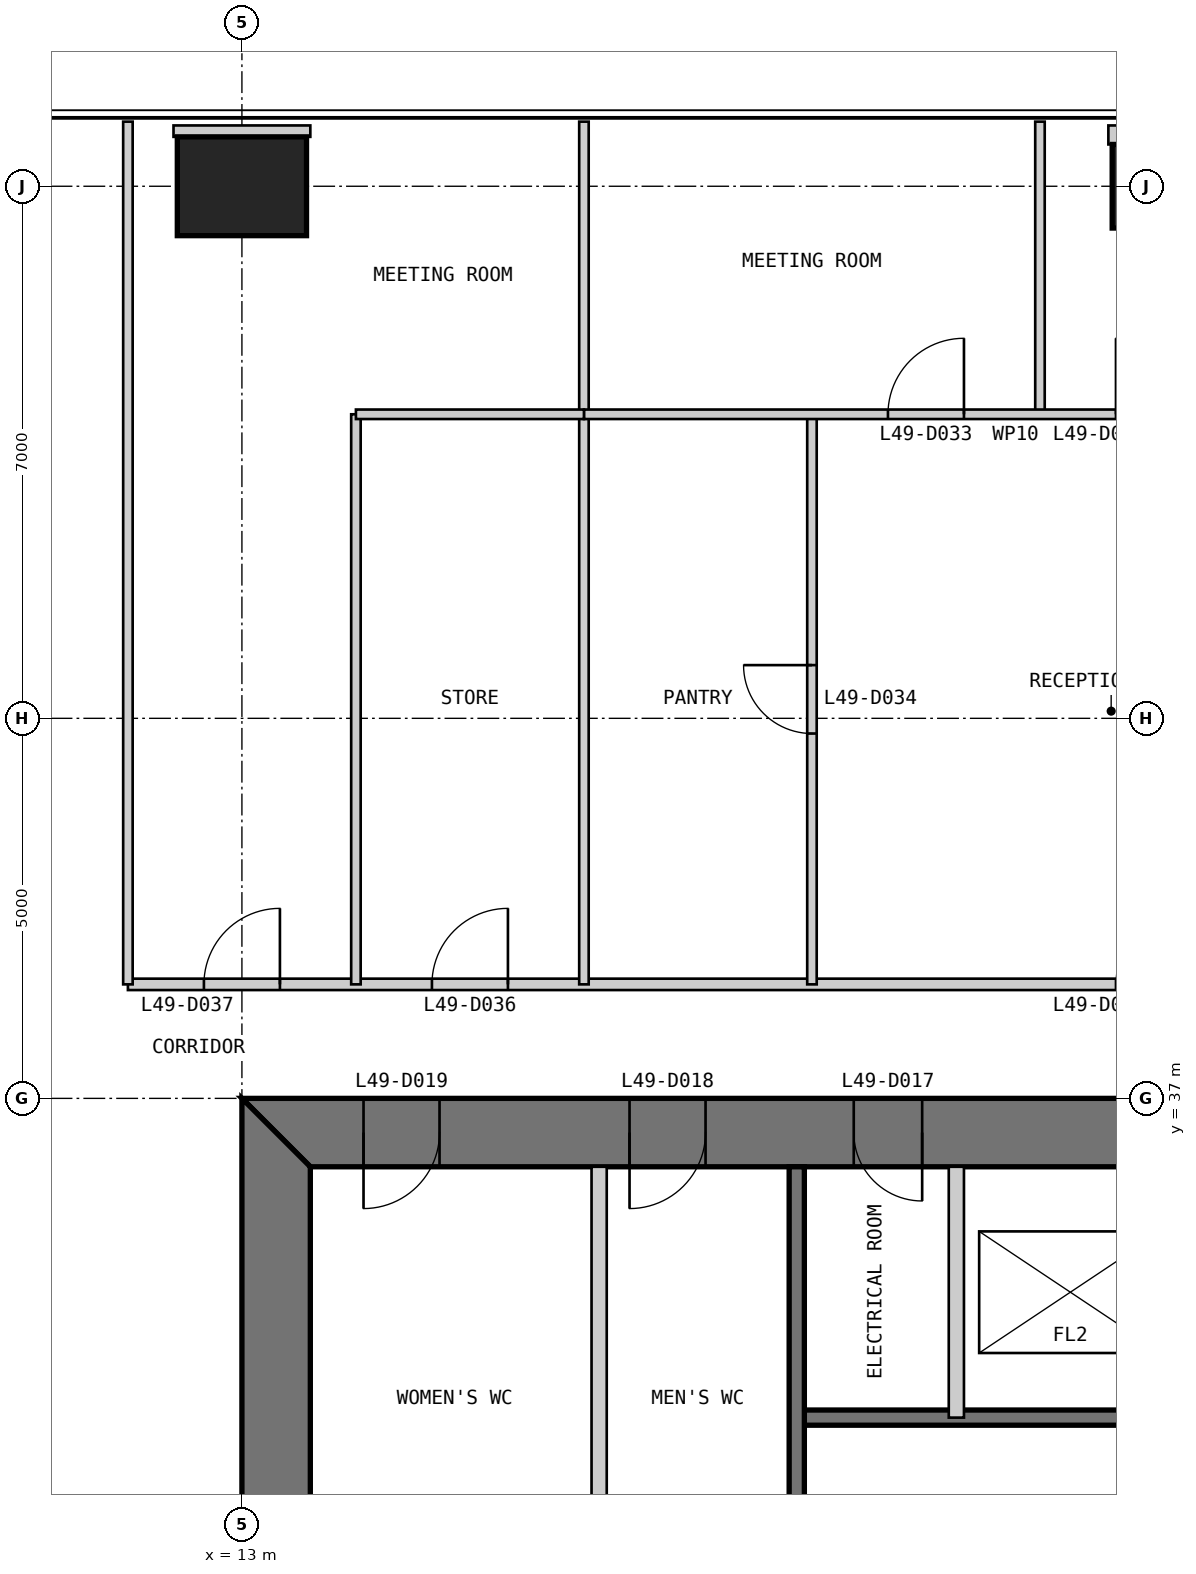
"""IFC4 building model, lengths in metres.
Left out: names, types, materials, properties, quantities, classifications, styles, units other than length and angle.
Written with IfcOpenShell. Run it as: python <this file> out.ifc"""

import sys

from ifc_helpers import new_model, si_unit, direction, frame, frame_2d, origin, origin_2d, place, context, subcontext, project, spatial, polyline, rectangle, outline, extrude, element, fill, save


model = new_model("IFC4")
c1 = context("Model", 3, precision=1e-05, world=origin(), true_north=direction((0.0, 1.0)))
c2 = subcontext(c1, "Body", "Model", "MODEL_VIEW")
j1 = project(units=[si_unit("LENGTHUNIT", "METRE"), si_unit("PLANEANGLEUNIT", "RADIAN")], contexts=[c1])
p1 = place(None, origin())
s1 = spatial("IfcSite", under=j1, at=p1, CompositionType="ELEMENT")
p2 = place(p1, origin())
s2 = spatial("IfcBuilding", under=s1, at=p2, CompositionType="ELEMENT")
p3 = place(p2, frame((0.0, 0.0, 209.8)))
s3 = spatial("IfcBuildingStorey", under=s2, at=p3, CompositionType="ELEMENT", Elevation=209.8)
p4 = place(p3, frame((25.0, 49.0, 0.0), z_axis=(0.0, 0.0, 1.0), x_axis=(1.0, 0.0, 0.0)))
e1 = element("IfcColumn", 1, at=p4, inside=s3, PredefinedType="COLUMN", context=c2, shape_type="SweptSolid", body=[
    extrude(rectangle(XDim=1.1, YDim=1.1, at=origin_2d()), origin(), (0.0, 0.0, 1.0), 4.0),
])
p5 = place(p3, frame((13.0, 49.0, 0.0), z_axis=(0.0, 0.0, 1.0), x_axis=(1.0, 0.0, 0.0)))
e2 = element("IfcColumn", 2, at=p5, inside=s3, PredefinedType="COLUMN", context=c2, shape_type="SweptSolid", body=[
    extrude(rectangle(XDim=1.7, YDim=1.3, at=origin_2d()), origin(), (0.0, 0.0, 1.0), 4.0),
])
p6 = place(p3, frame((37.0, 36.55, 0.0), z_axis=(0.0, 0.0, 1.0), x_axis=(-1.0, 0.0, 0.0)))
e3 = element("IfcWall", 3, at=p6, inside=s3, PredefinedType="SHEAR", context=c2, shape_type="SweptSolid", body=[
    extrude(outline(polyline([(0.0, -0.45), (24.0, -0.45), (23.1, 0.45), (0.9, 0.45), (0.0, -0.45)])), origin(), (0.0, 0.0, 1.0), 4.0),
])
p7 = place(p6, frame((4.9, 0.0, 0.0)))
e4 = element("IfcOpeningElement", 4, at=p7, cuts=e3, PredefinedType="OPENING", context=c2, shape_type="SweptSolid", body=[
    extrude(rectangle(XDim=1.0, YDim=2.2, at=frame_2d((0.5, 1.1))), frame((0.0, 0.46, 0.0), z_axis=(0.0, -1.0, 0.0), x_axis=(1.0, 0.0, 0.0)), (0.0, 0.0, 1.0), 0.92),
])
p8 = place(p6, frame((8.9, 0.0, 0.0)))
e5 = element("IfcOpeningElement", 5, at=p8, cuts=e3, PredefinedType="OPENING", context=c2, shape_type="SweptSolid", body=[
    extrude(rectangle(XDim=1.1, YDim=2.2, at=frame_2d((0.55, 1.1))), frame((0.0, 0.46, 0.0), z_axis=(0.0, -1.0, 0.0), x_axis=(1.0, 0.0, 0.0)), (0.0, 0.0, 1.0), 0.92),
])
p9 = place(p6, frame((15.05, 0.0, 0.0)))
e6 = element("IfcOpeningElement", 6, at=p9, cuts=e3, PredefinedType="OPENING", context=c2, shape_type="SweptSolid", body=[
    extrude(rectangle(XDim=0.9, YDim=2.2, at=frame_2d((0.45, 1.1))), frame((0.0, 0.46, 0.0), z_axis=(0.0, -1.0, 0.0), x_axis=(1.0, 0.0, 0.0)), (0.0, 0.0, 1.0), 0.92),
])
p10 = place(p6, frame((17.9, 0.0, 0.0)))
e7 = element("IfcOpeningElement", 7, at=p10, cuts=e3, PredefinedType="OPENING", context=c2, shape_type="SweptSolid", body=[
    extrude(rectangle(XDim=1.0, YDim=2.2, at=frame_2d((0.5, 1.1))), frame((0.0, 0.46, 0.0), z_axis=(0.0, -1.0, 0.0), x_axis=(1.0, 0.0, 0.0)), (0.0, 0.0, 1.0), 0.92),
])
p11 = place(p6, frame((21.4, 0.0, 0.0)))
e8 = element("IfcOpeningElement", 8, at=p11, cuts=e3, PredefinedType="OPENING", context=c2, shape_type="SweptSolid", body=[
    extrude(rectangle(XDim=1.0, YDim=2.2, at=frame_2d((0.5, 1.1))), frame((0.0, 0.46, 0.0), z_axis=(0.0, -1.0, 0.0), x_axis=(1.0, 0.0, 0.0)), (0.0, 0.0, 1.0), 0.92),
])
p12 = place(p3, frame((13.45, 36.1, 0.0), z_axis=(0.0, 0.0, 1.0), x_axis=(0.0, -1.0, 0.0)))
e9 = element("IfcWall", 9, at=p12, inside=s3, PredefinedType="SHEAR", context=c2, shape_type="SweptSolid", body=[
    extrude(outline(polyline([(-0.9, -0.45), (23.1, -0.45), (22.2, 0.45), (0.0, 0.45), (-0.9, -0.45)])), origin(), (0.0, 0.0, 1.0), 4.0),
])
p13 = place(p12, frame((20.2, 0.0, 0.0)))
e10 = element("IfcOpeningElement", 10, at=p13, cuts=e9, PredefinedType="OPENING", context=c2, shape_type="SweptSolid", body=[
    extrude(rectangle(XDim=1.0, YDim=2.2, at=frame_2d((0.5, 1.1))), frame((0.0, 0.46, 0.0), z_axis=(0.0, -1.0, 0.0), x_axis=(1.0, 0.0, 0.0)), (0.0, 0.0, 1.0), 0.92),
])
p14 = place(p12, frame((17.25, 0.0, 0.0)))
e11 = element("IfcOpeningElement", 11, at=p14, cuts=e9, PredefinedType="OPENING", context=c2, shape_type="SweptSolid", body=[
    extrude(rectangle(XDim=0.9, YDim=2.2, at=frame_2d((0.45, 1.1))), frame((0.0, 0.46, 0.0), z_axis=(0.0, -1.0, 0.0), x_axis=(1.0, 0.0, 0.0)), (0.0, 0.0, 1.0), 0.92),
])
p15 = place(p3, frame((29.7, 32.8, 0.0), z_axis=(0.0, 0.0, 1.0), x_axis=(-1.0, 0.0, 0.0)))
e12 = element("IfcWall", 12, at=p15, inside=s3, PredefinedType="SOLIDWALL", context=c2, shape_type="SweptSolid", body=[
    extrude(rectangle(XDim=9.4, YDim=0.2, at=frame_2d((4.7, 0.0))), origin(), (0.0, 0.0, 1.0), 3.8),
])
p16 = place(p15, frame((0.25, 0.0, 0.0)))
e13 = element("IfcOpeningElement", 13, at=p16, cuts=e12, PredefinedType="OPENING", context=c2, shape_type="SweptSolid", body=[
    extrude(rectangle(XDim=1.0, YDim=2.2, at=frame_2d((0.5, 1.1))), frame((0.0, 0.11, 0.0), z_axis=(0.0, -1.0, 0.0), x_axis=(1.0, 0.0, 0.0)), (0.0, 0.0, 1.0), 0.22),
])
p17 = place(p3, frame((22.4, 36.1, 0.0), z_axis=(0.0, 0.0, 1.0), x_axis=(0.0, -1.0, 0.0)))
e14 = element("IfcWall", 14, at=p17, inside=s3, PredefinedType="PARTITIONING", context=c2, shape_type="SweptSolid", body=[
    extrude(rectangle(XDim=3.3, YDim=0.2, at=frame_2d((1.65, 0.0))), origin(), (0.0, 0.0, 1.0), 3.8),
])
p18 = place(p3, frame((20.3, 36.1, 0.0), z_axis=(0.0, 0.0, 1.0), x_axis=(0.0, -1.0, 0.0)))
e15 = element("IfcWall", 15, at=p18, inside=s3, PredefinedType="SOLIDWALL", context=c2, shape_type="SweptSolid", body=[
    extrude(rectangle(XDim=6.1, YDim=0.2, at=frame_2d((3.05, 0.0))), origin(), (0.0, 0.0, 1.0), 3.8),
])
p19 = place(p3, frame((17.7, 36.1, 0.0), z_axis=(0.0, 0.0, 1.0), x_axis=(0.0, -1.0, 0.0)))
e16 = element("IfcWall", 16, at=p19, inside=s3, PredefinedType="PARTITIONING", context=c2, shape_type="SweptSolid", body=[
    extrude(rectangle(XDim=6.1, YDim=0.2, at=frame_2d((3.05, 0.0))), origin(), (0.0, 0.0, 1.0), 3.8),
])
p20 = place(p3, frame((38.5, 38.5, 0.0), z_axis=(0.0, 0.0, 1.0), x_axis=(-1.0, 0.0, 0.0)))
e17 = element("IfcWall", 17, at=p20, inside=s3, PredefinedType="PARTITIONING", context=c2, shape_type="SweptSolid", body=[
    extrude(rectangle(XDim=27.0, YDim=0.15, at=frame_2d((13.5, 0.0))), origin(), (0.0, 0.0, 1.0), 3.85),
])
p21 = place(p20, frame((13.0, 0.0, 0.0)))
e18 = element("IfcOpeningElement", 18, at=p21, cuts=e17, PredefinedType="OPENING", context=c2, shape_type="SweptSolid", body=[
    extrude(rectangle(XDim=1.0, YDim=2.2, at=frame_2d((0.5, 1.1))), frame((0.0, 0.085, 0.0), z_axis=(0.0, -1.0, 0.0), x_axis=(1.0, 0.0, 0.0)), (0.0, 0.0, 1.0), 0.17),
])
p22 = place(p20, frame((4.0, 0.0, 0.0)))
e19 = element("IfcOpeningElement", 19, at=p22, cuts=e17, PredefinedType="OPENING", context=c2, shape_type="SweptSolid", body=[
    extrude(rectangle(XDim=1.0, YDim=2.2, at=frame_2d((0.5, 1.1))), frame((0.0, 0.085, 0.0), z_axis=(0.0, -1.0, 0.0), x_axis=(1.0, 0.0, 0.0)), (0.0, 0.0, 1.0), 0.17),
])
p23 = place(p20, frame((22.0, 0.0, 0.0)))
e20 = element("IfcOpeningElement", 20, at=p23, cuts=e17, PredefinedType="OPENING", context=c2, shape_type="SweptSolid", body=[
    extrude(rectangle(XDim=1.0, YDim=2.2, at=frame_2d((0.5, 1.1))), frame((0.0, 0.085, 0.0), z_axis=(0.0, -1.0, 0.0), x_axis=(1.0, 0.0, 0.0)), (0.0, 0.0, 1.0), 0.17),
])
p24 = place(p20, frame((25.0, 0.0, 0.0)))
e21 = element("IfcOpeningElement", 21, at=p24, cuts=e17, PredefinedType="OPENING", context=c2, shape_type="SweptSolid", body=[
    extrude(rectangle(XDim=1.0, YDim=2.2, at=frame_2d((0.5, 1.1))), frame((0.0, 0.085, 0.0), z_axis=(0.0, -1.0, 0.0), x_axis=(1.0, 0.0, 0.0)), (0.0, 0.0, 1.0), 0.17),
])
p25 = place(p3, frame((23.5, 49.85, 0.0), z_axis=(0.0, 0.0, 1.0), x_axis=(0.0, -1.0, 0.0)))
e22 = element("IfcWall", 22, at=p25, inside=s3, PredefinedType="PARTITIONING", context=c2, shape_type="SweptSolid", body=[
    extrude(rectangle(XDim=3.85, YDim=0.125, at=frame_2d((1.925, 0.0))), origin(), (0.0, 0.0, 1.0), 3.85),
])
p26 = place(p3, frame((20.5, 46.0, 0.0), z_axis=(0.0, 0.0, 1.0), x_axis=(0.0, -1.0, 0.0)))
e23 = element("IfcWall", 23, at=p26, inside=s3, PredefinedType="PARTITIONING", context=c2, shape_type="SweptSolid", body=[
    extrude(rectangle(XDim=7.5, YDim=0.125, at=frame_2d((3.75, 0.0))), origin(), (0.0, 0.0, 1.0), 3.85),
])
p27 = place(p26, frame((3.3, 0.0, 0.0)))
e24 = element("IfcOpeningElement", 24, at=p27, cuts=e23, PredefinedType="OPENING", context=c2, shape_type="SweptSolid", body=[
    extrude(rectangle(XDim=0.9, YDim=2.2, at=frame_2d((0.45, 1.1))), frame((0.0, 0.073, 0.0), z_axis=(0.0, -1.0, 0.0), x_axis=(1.0, 0.0, 0.0)), (0.0, 0.0, 1.0), 0.145),
])
p28 = place(p3, frame((17.5, 49.85, 0.0), z_axis=(0.0, 0.0, 1.0), x_axis=(0.0, -1.0, 0.0)))
e25 = element("IfcWall", 25, at=p28, inside=s3, PredefinedType="PARTITIONING", context=c2, shape_type="SweptSolid", body=[
    extrude(rectangle(XDim=11.35, YDim=0.125, at=frame_2d((5.675, 0.0))), origin(), (0.0, 0.0, 1.0), 3.85),
])
p29 = place(p3, frame((14.5, 46.0, 0.0), z_axis=(0.0, 0.0, 1.0), x_axis=(0.0, -1.0, 0.0)))
e26 = element("IfcWall", 26, at=p29, inside=s3, PredefinedType="PARTITIONING", context=c2, shape_type="SweptSolid", body=[
    extrude(rectangle(XDim=7.5, YDim=0.125, at=frame_2d((3.75, 0.0))), origin(), (0.0, 0.0, 1.0), 3.85),
])
p30 = place(p3, frame((29.5, 46.0, 0.0), z_axis=(0.0, 0.0, 1.0), x_axis=(-1.0, 0.0, 0.0)))
e27 = element("IfcWall", 27, at=p30, inside=s3, PredefinedType="PARTITIONING", context=c2, shape_type="SweptSolid", body=[
    extrude(rectangle(XDim=12.0, YDim=0.125, at=frame_2d((6.0, 0.0))), origin(), (0.0, 0.0, 1.0), 3.85),
])
p31 = place(p30, frame((4.0, 0.0, 0.0)))
e28 = element("IfcOpeningElement", 28, at=p31, cuts=e27, PredefinedType="OPENING", context=c2, shape_type="SweptSolid", body=[
    extrude(rectangle(XDim=1.0, YDim=2.2, at=frame_2d((0.5, 1.1))), frame((0.0, 0.073, 0.0), z_axis=(0.0, -1.0, 0.0), x_axis=(1.0, 0.0, 0.0)), (0.0, 0.0, 1.0), 0.145),
])
p32 = place(p30, frame((7.0, 0.0, 0.0)))
e29 = element("IfcOpeningElement", 29, at=p32, cuts=e27, PredefinedType="OPENING", context=c2, shape_type="SweptSolid", body=[
    extrude(rectangle(XDim=1.0, YDim=2.2, at=frame_2d((0.5, 1.1))), frame((0.0, 0.073, 0.0), z_axis=(0.0, -1.0, 0.0), x_axis=(1.0, 0.0, 0.0)), (0.0, 0.0, 1.0), 0.145),
])
p33 = place(p3, frame((17.5, 46.0, 0.0), z_axis=(0.0, 0.0, 1.0), x_axis=(-1.0, 0.0, 0.0)))
e30 = element("IfcWall", 30, at=p33, inside=s3, PredefinedType="PARTITIONING", context=c2, shape_type="SweptSolid", body=[
    extrude(rectangle(XDim=3.0, YDim=0.125, at=frame_2d((1.5, 0.0))), origin(), (0.0, 0.0, 1.0), 3.85),
])
p34 = place(p3, frame((11.5, 49.85, 0.0), z_axis=(0.0, 0.0, 1.0), x_axis=(0.0, -1.0, 0.0)))
e31 = element("IfcWall", 31, at=p34, inside=s3, PredefinedType="PARTITIONING", context=c2, shape_type="SweptSolid", body=[
    extrude(rectangle(XDim=11.35, YDim=0.125, at=frame_2d((5.675, 0.0))), origin(), (0.0, 0.0, 1.0), 3.85),
])
p35 = place(p3, frame((25.0, 49.8, 0.0), z_axis=(0.0, 0.0, 1.0), x_axis=(0.0, -1.0, 0.0)))
e32 = element("IfcWall", 32, at=p35, inside=s3, PredefinedType="PARTITIONING", context=c2, shape_type="SweptSolid", body=[
    extrude(rectangle(XDim=0.25, YDim=1.2, at=frame_2d((0.125, 0.0))), origin(), (0.0, 0.0, 1.0), 3.85),
])
p36 = place(p3, frame((13.0, 49.8, 0.0), z_axis=(0.0, 0.0, 1.0), x_axis=(0.0, -1.0, 0.0)))
e33 = element("IfcWall", 33, at=p36, inside=s3, PredefinedType="PARTITIONING", context=c2, shape_type="SweptSolid", body=[
    extrude(rectangle(XDim=0.15, YDim=1.8, at=frame_2d((0.075, 0.0))), origin(), (0.0, 0.0, 1.0), 3.85),
])
p37 = place(p9, origin())
e34 = element("IfcDoor", 34, at=p37, inside=s3, OperationType="SINGLE_SWING_LEFT", PredefinedType="DOOR", context=c2, shape_type="SweptSolid", body=[
    extrude(rectangle(XDim=0.9, YDim=2.2, at=frame_2d((0.45, 1.1))), frame((0.0, 0.025, 0.0), z_axis=(0.0, -1.0, 0.0), x_axis=(1.0, 0.0, 0.0)), (0.0, 0.0, 1.0), 0.05),
    extrude(outline(polyline([(0.0, 0.0), (0.04, 0.0), (0.04, 2.16), (0.86, 2.16), (0.86, 0.0), (0.9, 0.0), (0.9, 2.2), (0.0, 2.2), (0.0, 0.0)])), frame((0.0, 0.3, 0.0), z_axis=(0.0, -1.0, 0.0), x_axis=(1.0, 0.0, 0.0)), (0.0, 0.0, 1.0), 0.6),
])
fill(e6, e34)
p38 = place(p10, origin())
e35 = element("IfcDoor", 35, at=p38, inside=s3, OperationType="SINGLE_SWING_RIGHT", PredefinedType="DOOR", context=c2, shape_type="SweptSolid", body=[
    extrude(rectangle(XDim=1.0, YDim=2.2, at=frame_2d((0.5, 1.1))), frame((0.0, 0.025, 0.0), z_axis=(0.0, -1.0, 0.0), x_axis=(1.0, 0.0, 0.0)), (0.0, 0.0, 1.0), 0.05),
    extrude(outline(polyline([(0.0, 0.0), (0.04, 0.0), (0.04, 2.16), (0.96, 2.16), (0.96, 0.0), (1.0, 0.0), (1.0, 2.2), (0.0, 2.2), (0.0, 0.0)])), frame((0.0, 0.3, 0.0), z_axis=(0.0, -1.0, 0.0), x_axis=(1.0, 0.0, 0.0)), (0.0, 0.0, 1.0), 0.6),
])
fill(e7, e35)
p39 = place(p11, origin())
e36 = element("IfcDoor", 36, at=p39, inside=s3, OperationType="SINGLE_SWING_RIGHT", PredefinedType="DOOR", context=c2, shape_type="SweptSolid", body=[
    extrude(rectangle(XDim=1.0, YDim=2.2, at=frame_2d((0.5, 1.1))), frame((0.0, 0.025, 0.0), z_axis=(0.0, -1.0, 0.0), x_axis=(1.0, 0.0, 0.0)), (0.0, 0.0, 1.0), 0.05),
    extrude(outline(polyline([(0.0, 0.0), (0.04, 0.0), (0.04, 2.16), (0.96, 2.16), (0.96, 0.0), (1.0, 0.0), (1.0, 2.2), (0.0, 2.2), (0.0, 0.0)])), frame((0.0, 0.3, 0.0), z_axis=(0.0, -1.0, 0.0), x_axis=(1.0, 0.0, 0.0)), (0.0, 0.0, 1.0), 0.6),
])
fill(e8, e36)
p40 = place(p32, frame((1.0, 0.0, 0.0), z_axis=(0.0, 0.0, 1.0), x_axis=(-1.0, 0.0, 0.0)))
e37 = element("IfcDoor", 37, at=p40, inside=s3, OperationType="SINGLE_SWING_RIGHT", PredefinedType="DOOR", context=c2, shape_type="SweptSolid", body=[
    extrude(rectangle(XDim=1.0, YDim=2.2, at=frame_2d((0.5, 1.1))), frame((0.0, 0.025, 0.0), z_axis=(0.0, -1.0, 0.0), x_axis=(1.0, 0.0, 0.0)), (0.0, 0.0, 1.0), 0.05),
])
fill(e29, e37)
p41 = place(p27, frame((0.9, 0.0, 0.0), z_axis=(0.0, 0.0, 1.0), x_axis=(-1.0, 0.0, 0.0)))
e38 = element("IfcDoor", 38, at=p41, inside=s3, OperationType="SINGLE_SWING_RIGHT", PredefinedType="DOOR", context=c2, shape_type="SweptSolid", body=[
    extrude(rectangle(XDim=0.9, YDim=2.2, at=frame_2d((0.45, 1.1))), frame((0.0, 0.025, 0.0), z_axis=(0.0, -1.0, 0.0), x_axis=(1.0, 0.0, 0.0)), (0.0, 0.0, 1.0), 0.05),
])
fill(e24, e38)
p42 = place(p23, frame((1.0, 0.0, 0.0), z_axis=(0.0, 0.0, 1.0), x_axis=(-1.0, 0.0, 0.0)))
e39 = element("IfcDoor", 39, at=p42, inside=s3, OperationType="SINGLE_SWING_RIGHT", PredefinedType="DOOR", context=c2, shape_type="SweptSolid", body=[
    extrude(rectangle(XDim=1.0, YDim=2.2, at=frame_2d((0.5, 1.1))), frame((0.0, 0.025, 0.0), z_axis=(0.0, -1.0, 0.0), x_axis=(1.0, 0.0, 0.0)), (0.0, 0.0, 1.0), 0.05),
])
fill(e20, e39)
p43 = place(p24, frame((1.0, 0.0, 0.0), z_axis=(0.0, 0.0, 1.0), x_axis=(-1.0, 0.0, 0.0)))
e40 = element("IfcDoor", 40, at=p43, inside=s3, OperationType="SINGLE_SWING_RIGHT", PredefinedType="DOOR", context=c2, shape_type="SweptSolid", body=[
    extrude(rectangle(XDim=1.0, YDim=2.2, at=frame_2d((0.5, 1.1))), frame((0.0, 0.025, 0.0), z_axis=(0.0, -1.0, 0.0), x_axis=(1.0, 0.0, 0.0)), (0.0, 0.0, 1.0), 0.05),
])
fill(e21, e40)
save(model, sys.argv[1])
